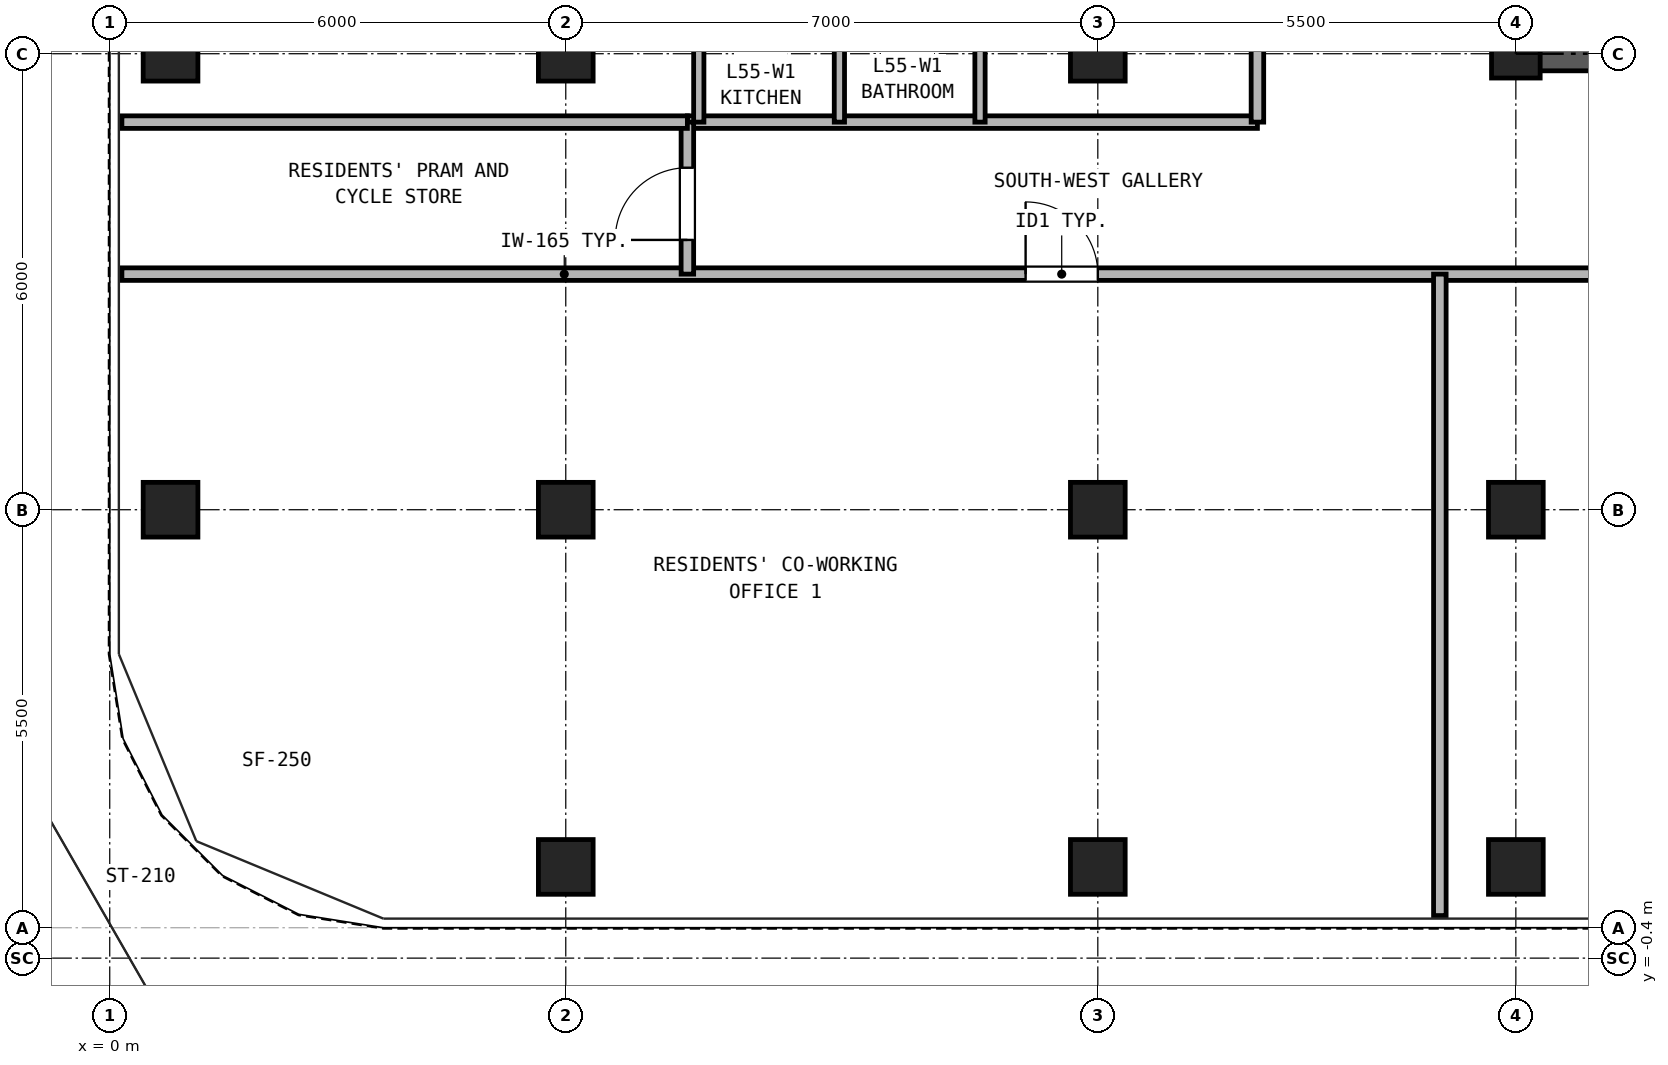
"""IFC4 building model, lengths in metres.
Left out: names, types, materials, properties, quantities, classifications, styles, units other than length and angle.
Written with IfcOpenShell. Run it as: python <this file> out.ifc"""

import sys

from ifc_helpers import new_model, si_unit, direction, frame, frame_2d, origin, origin_2d, place, context, subcontext, project, spatial, rectangle, hollow_rectangle, extrude, source, transform, mapped, element, fill, save


model = new_model("IFC4")
c1 = context("Model", 3, precision=1e-05, world=origin(), true_north=direction((0.0, 1.0)))
c2 = subcontext(c1, "Body", "Model", "MODEL_VIEW")
j1 = project(units=[si_unit("LENGTHUNIT", "METRE"), si_unit("PLANEANGLEUNIT", "RADIAN")], contexts=[c1])
p1 = place(None, origin())
s1 = spatial("IfcSite", under=j1, at=p1, CompositionType="ELEMENT")
p2 = place(p1, origin())
s2 = spatial("IfcBuilding", under=s1, at=p2, CompositionType="ELEMENT")
p3 = place(p2, frame((0.0, 0.0, 196.4)))
s3 = spatial("IfcBuildingStorey", under=s2, at=p3, CompositionType="ELEMENT", Elevation=196.4)
m1 = source(origin(), c2, "Body", "SweptSolid", [
    extrude(hollow_rectangle(XDim=0.72, YDim=0.72, WallThickness=0.04, at=origin_2d()), origin(), (0.0, 0.0, 1.0), 2.95),
])
for number, where, z_axis, x_axis in (
    (1, (6.0, 0.8, 0.0), (0.0, 0.0, 1.0), (1.0, 0.0, 0.0)),
    (2, (13.0, 0.8, 0.0), (0.0, 0.0, 1.0), (1.0, 0.0, 0.0)),
    (3, (18.5, 0.8, 0.0), (0.0, 0.0, 1.0), (1.0, 0.0, 0.0)),
    (4, (0.8, 5.5, 0.0), (0.0, 0.0, 1.0), (1.0, 0.0, 0.0)),
    (5, (0.8, 11.5, 0.0), (0.0, 0.0, 1.0), (1.0, 0.0, 0.0)),
    (6, (6.0, 5.5, 0.0), (0.0, 0.0, 1.0), (1.0, 0.0, 0.0)),
    (7, (6.0, 11.5, 0.0), (0.0, 0.0, 1.0), (1.0, 0.0, 0.0)),
    (8, (13.0, 5.5, 0.0), (0.0, 0.0, 1.0), (1.0, 0.0, 0.0)),
    (9, (13.0, 11.5, 0.0), (0.0, 0.0, 1.0), (1.0, 0.0, 0.0)),
    (10, (18.5, 5.5, 0.0), (0.0, 0.0, 1.0), (1.0, 0.0, 0.0)),
):
    element("IfcColumn", number, at=place(p3, frame(where, z_axis=z_axis, x_axis=x_axis)), inside=s3, PredefinedType="COLUMN", context=c2, shape_type="MappedRepresentation", body=[
        mapped(m1, transform((0.0, 0.0, 0.0), x_axis=(1.0, 0.0, 0.0), y_axis=(0.0, 1.0, 0.0), z_axis=(0.0, 0.0, 1.0), scale=1.0)),
    ])
m2 = source(origin(), c2, "Body", "SweptSolid", [
    extrude(hollow_rectangle(XDim=0.64, YDim=0.64, WallThickness=0.035, at=origin_2d()), origin(), (0.0, 0.0, 1.0), 2.95),
])
p4 = place(p3, frame((18.5, 11.5, 0.0), z_axis=(0.0, 0.0, 1.0), x_axis=(1.0, 0.0, 0.0)))
e11 = element("IfcColumn", 11, at=p4, inside=s3, PredefinedType="COLUMN", context=c2, shape_type="MappedRepresentation", body=[
    mapped(m2, transform((0.0, 0.0, 0.0), x_axis=(1.0, 0.0, 0.0), y_axis=(0.0, 1.0, 0.0), z_axis=(0.0, 0.0, 1.0), scale=1.0)),
])
p5 = place(p3, frame((18.275, 11.5, 0.0), z_axis=(0.0, 0.0, 1.0), x_axis=(1.0, 0.0, 0.0)))
e12 = element("IfcWall", 12, at=p5, inside=s3, PredefinedType="SHEAR", context=c2, shape_type="SweptSolid", body=[
    extrude(rectangle(XDim=10.45, YDim=0.45, at=frame_2d((5.225, 0.0))), origin(), (0.0, 0.0, 1.0), 2.95),
])
p6 = place(p5, frame((1.825, 0.0, 0.0)))
e13 = element("IfcOpeningElement", 13, at=p6, cuts=e12, PredefinedType="OPENING", context=c2, shape_type="SweptSolid", body=[
    extrude(rectangle(XDim=0.95, YDim=2.15, at=frame_2d((0.475, 1.075))), frame((0.0, 0.235, 0.0), z_axis=(0.0, -1.0, 0.0), x_axis=(1.0, 0.0, 0.0)), (0.0, 0.0, 1.0), 0.47),
])
p7 = place(p5, frame((5.325, 0.0, 0.0)))
e14 = element("IfcOpeningElement", 14, at=p7, cuts=e12, PredefinedType="OPENING", context=c2, shape_type="SweptSolid", body=[
    extrude(rectangle(XDim=0.95, YDim=2.15, at=frame_2d((0.475, 1.075))), frame((0.0, 0.235, 0.0), z_axis=(0.0, -1.0, 0.0), x_axis=(1.0, 0.0, 0.0)), (0.0, 0.0, 1.0), 0.47),
])
p8 = place(p5, frame((8.225, 0.0, 0.0)))
e15 = element("IfcOpeningElement", 15, at=p8, cuts=e12, PredefinedType="OPENING", context=c2, shape_type="SweptSolid", body=[
    extrude(rectangle(XDim=1.1, YDim=2.25, at=frame_2d((0.55, 1.125))), frame((0.0, 0.235, 0.0), z_axis=(0.0, -1.0, 0.0), x_axis=(1.0, 0.0, 0.0)), (0.0, 0.0, 1.0), 0.47),
])
p9 = place(p3, frame((0.16, 8.6, 0.0), z_axis=(0.0, 0.0, 1.0), x_axis=(1.0, 0.0, 0.0)))
e16 = element("IfcWall", 16, at=p9, inside=s3, PredefinedType="PARTITIONING", context=c2, shape_type="SweptSolid", body=[
    extrude(rectangle(XDim=41.48, YDim=0.165, at=frame_2d((20.74, 0.0))), origin(), (0.0, 0.0, 1.0), 2.583),
])
p10 = place(p9, frame((11.89, 0.0, 0.0)))
e17 = element("IfcOpeningElement", 17, at=p10, cuts=e16, PredefinedType="OPENING", context=c2, shape_type="SweptSolid", body=[
    extrude(rectangle(XDim=0.95, YDim=2.15, at=frame_2d((0.475, 1.075))), frame((0.0, 0.093, 0.0), z_axis=(0.0, -1.0, 0.0), x_axis=(1.0, 0.0, 0.0)), (0.0, 0.0, 1.0), 0.185),
])
p11 = place(p9, frame((20.59, 0.0, 0.0)))
e18 = element("IfcOpeningElement", 18, at=p11, cuts=e16, PredefinedType="OPENING", context=c2, shape_type="SweptSolid", body=[
    extrude(rectangle(XDim=0.95, YDim=2.15, at=frame_2d((0.475, 1.075))), frame((0.0, 0.093, 0.0), z_axis=(0.0, -1.0, 0.0), x_axis=(1.0, 0.0, 0.0)), (0.0, 0.0, 1.0), 0.185),
])
p12 = place(p9, frame((27.59, 0.0, 0.0)))
e19 = element("IfcOpeningElement", 19, at=p12, cuts=e16, PredefinedType="OPENING", context=c2, shape_type="SweptSolid", body=[
    extrude(rectangle(XDim=0.95, YDim=2.15, at=frame_2d((0.475, 1.075))), frame((0.0, 0.093, 0.0), z_axis=(0.0, -1.0, 0.0), x_axis=(1.0, 0.0, 0.0)), (0.0, 0.0, 1.0), 0.185),
])
p13 = place(p9, frame((34.19, 0.0, 0.0)))
e20 = element("IfcOpeningElement", 20, at=p13, cuts=e16, PredefinedType="OPENING", context=c2, shape_type="SweptSolid", body=[
    extrude(rectangle(XDim=0.95, YDim=2.15, at=frame_2d((0.475, 1.075))), frame((0.0, 0.093, 0.0), z_axis=(0.0, -1.0, 0.0), x_axis=(1.0, 0.0, 0.0)), (0.0, 0.0, 1.0), 0.185),
])
p14 = place(p3, frame((7.6, 10.6, 0.0), z_axis=(0.0, 0.0, 1.0), x_axis=(1.0, 0.0, 0.0)))
e21 = element("IfcWall", 21, at=p14, inside=s3, PredefinedType="PARTITIONING", context=c2, shape_type="SweptSolid", body=[
    extrude(rectangle(XDim=7.5, YDim=0.165, at=frame_2d((3.75, 0.0))), origin(), (0.0, 0.0, 1.0), 2.95),
])
p15 = place(p3, frame((7.6, 8.6, 0.0), z_axis=(0.0, 0.0, 1.0), x_axis=(0.0, 1.0, 0.0)))
e22 = element("IfcWall", 22, at=p15, inside=s3, PredefinedType="PARTITIONING", context=c2, shape_type="SweptSolid", body=[
    extrude(rectangle(XDim=2.0, YDim=0.165, at=frame_2d((1.0, 0.0))), origin(), (0.0, 0.0, 1.0), 2.95),
])
p16 = place(p15, frame((0.45, 0.0, 0.0)))
e23 = element("IfcOpeningElement", 23, at=p16, cuts=e22, PredefinedType="OPENING", context=c2, shape_type="SweptSolid", body=[
    extrude(rectangle(XDim=0.95, YDim=2.15, at=frame_2d((0.475, 1.075))), frame((0.0, 0.093, 0.0), z_axis=(0.0, -1.0, 0.0), x_axis=(1.0, 0.0, 0.0)), (0.0, 0.0, 1.0), 0.185),
])
p17 = place(p3, frame((15.1, 10.6, 0.0), z_axis=(0.0, 0.0, 1.0), x_axis=(0.0, 1.0, 0.0)))
e24 = element("IfcWall", 24, at=p17, inside=s3, PredefinedType="PARTITIONING", context=c2, shape_type="SweptSolid", body=[
    extrude(rectangle(XDim=24.54, YDim=0.165, at=frame_2d((12.27, 0.0))), origin(), (0.0, 0.0, 1.0), 2.95),
])
p18 = place(p17, frame((3.3, 0.0, 0.0)))
e25 = element("IfcOpeningElement", 25, at=p18, cuts=e24, PredefinedType="OPENING", context=c2, shape_type="SweptSolid", body=[
    extrude(rectangle(XDim=1.0, YDim=2.15, at=frame_2d((0.5, 1.075))), frame((0.0, 0.093, 0.0), z_axis=(0.0, -1.0, 0.0), x_axis=(1.0, 0.0, 0.0)), (0.0, 0.0, 1.0), 0.185),
])
p19 = place(p17, frame((11.1, 0.0, 0.0)))
e26 = element("IfcOpeningElement", 26, at=p19, cuts=e24, PredefinedType="OPENING", context=c2, shape_type="SweptSolid", body=[
    extrude(rectangle(XDim=1.0, YDim=2.15, at=frame_2d((0.5, 1.075))), frame((0.0, 0.093, 0.0), z_axis=(0.0, -1.0, 0.0), x_axis=(1.0, 0.0, 0.0)), (0.0, 0.0, 1.0), 0.185),
])
p20 = place(p17, frame((18.0, 0.0, 0.0)))
e27 = element("IfcOpeningElement", 27, at=p20, cuts=e24, PredefinedType="OPENING", context=c2, shape_type="SweptSolid", body=[
    extrude(rectangle(XDim=1.0, YDim=2.15, at=frame_2d((0.5, 1.075))), frame((0.0, 0.093, 0.0), z_axis=(0.0, -1.0, 0.0), x_axis=(1.0, 0.0, 0.0)), (0.0, 0.0, 1.0), 0.185),
])
p21 = place(p3, frame((17.5, 0.16, 0.0), z_axis=(0.0, 0.0, 1.0), x_axis=(0.0, 1.0, 0.0)))
e28 = element("IfcWall", 28, at=p21, inside=s3, PredefinedType="PARTITIONING", context=c2, shape_type="SweptSolid", body=[
    extrude(rectangle(XDim=8.44, YDim=0.165, at=frame_2d((4.22, 0.0))), origin(), (0.0, 0.0, 1.0), 2.95),
])
p22 = place(p3, frame((0.16, 10.6, 0.0), z_axis=(0.0, 0.0, 1.0), x_axis=(1.0, 0.0, 0.0)))
e29 = element("IfcWall", 29, at=p22, inside=s3, PredefinedType="PARTITIONING", context=c2, shape_type="SweptSolid", body=[
    extrude(rectangle(XDim=7.44, YDim=0.165, at=frame_2d((3.72, 0.0))), origin(), (0.0, 0.0, 1.0), 2.95),
])
for number, where, z_axis, x_axis in (
    (30, (7.75, 10.6, 0.0), (0.0, 0.0, 1.0), (0.0, 1.0, 0.0)),
    (31, (9.6, 10.6, 0.0), (0.0, 0.0, 1.0), (0.0, 1.0, 0.0)),
    (32, (11.45, 10.6, 0.0), (0.0, 0.0, 1.0), (0.0, 1.0, 0.0)),
):
    element("IfcWall", number, at=place(p3, frame(where, z_axis=z_axis, x_axis=x_axis)), inside=s3, PredefinedType="PARTITIONING", context=c2, shape_type="SweptSolid", body=[
        extrude(rectangle(XDim=2.15, YDim=0.135, at=frame_2d((1.075, 0.0))), origin(), (0.0, 0.0, 1.0), 2.95),
    ])
p23 = place(p10, frame((0.95, 0.0, 0.0), z_axis=(0.0, 0.0, 1.0), x_axis=(-1.0, 0.0, 0.0)))
e33 = element("IfcDoor", 33, at=p23, inside=s3, OperationType="SINGLE_SWING_LEFT", PredefinedType="DOOR", context=c2, shape_type="SweptSolid", body=[
    extrude(rectangle(XDim=0.95, YDim=2.15, at=frame_2d((0.475, 1.075))), frame((0.0, 0.025, 0.0), z_axis=(0.0, -1.0, 0.0), x_axis=(1.0, 0.0, 0.0)), (0.0, 0.0, 1.0), 0.05),
])
fill(e17, e33)
p24 = place(p16, frame((0.95, 0.0, 0.0), z_axis=(0.0, 0.0, 1.0), x_axis=(-1.0, 0.0, 0.0)))
e34 = element("IfcDoor", 34, at=p24, inside=s3, OperationType="SINGLE_SWING_LEFT", PredefinedType="DOOR", context=c2, shape_type="SweptSolid", body=[
    extrude(rectangle(XDim=0.95, YDim=2.15, at=frame_2d((0.475, 1.075))), frame((0.0, 0.025, 0.0), z_axis=(0.0, -1.0, 0.0), x_axis=(1.0, 0.0, 0.0)), (0.0, 0.0, 1.0), 0.05),
])
fill(e23, e34)
save(model, sys.argv[1])
